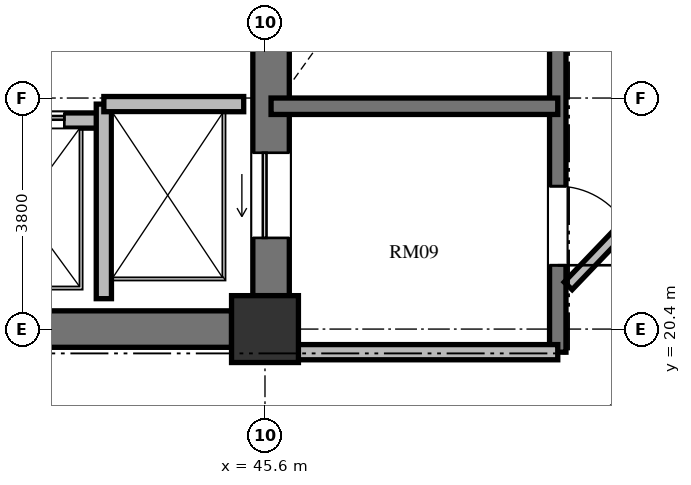
"""IFC4 building model, lengths in metres.
Left out: names, types, materials, properties, quantities, classifications, styles, units other than length and angle.
Written with IfcOpenShell. Run it as: python <this file> out.ifc"""

import sys

from ifc_helpers import new_model, si_unit, direction, frame, frame_2d, origin, origin_2d, place, context, subcontext, project, spatial, rectangle, extrude, element, fill, save


model = new_model("IFC4")
c1 = context("Model", 3, precision=1e-05, world=origin(), true_north=direction((0.0, 1.0)))
c2 = subcontext(c1, "Body", "Model", "MODEL_VIEW")
j1 = project(units=[si_unit("LENGTHUNIT", "METRE"), si_unit("PLANEANGLEUNIT", "RADIAN")], contexts=[c1])
p1 = place(None, origin())
s1 = spatial("IfcSite", under=j1, at=p1, CompositionType="ELEMENT")
p2 = place(p1, origin())
s2 = spatial("IfcBuilding", under=s1, at=p2, CompositionType="ELEMENT")
p3 = place(p2, frame((0.0, 0.0, 205.776)))
s3 = spatial("IfcBuildingStorey", under=s2, at=p3, CompositionType="ELEMENT", Elevation=205.776)
p4 = place(p3, frame((45.6, 20.4, 0.0), z_axis=(0.0, 0.0, 1.0), x_axis=(1.0, 0.0, 0.0)))
e1 = element("IfcColumn", 1, at=p4, inside=s3, PredefinedType="COLUMN", context=c2, shape_type="SweptSolid", body=[
    extrude(rectangle(XDim=1.1, YDim=1.1, at=origin_2d()), origin(), (0.0, 0.0, 1.0), 3.648),
])
p5 = place(p3, frame((45.7, 20.95, 0.0), z_axis=(0.0, 0.0, 1.0), x_axis=(0.0, 1.0, 0.0)))
e2 = element("IfcWall", 2, at=p5, inside=s3, PredefinedType="SHEAR", context=c2, shape_type="SweptSolid", body=[
    extrude(rectangle(XDim=14.1, YDim=0.6, at=frame_2d((7.05, 0.0))), origin(), (0.0, 0.0, 1.0), 3.648),
])
p6 = place(p5, frame((11.75, 0.0, 0.0)))
e3 = element("IfcOpeningElement", 3, at=p6, cuts=e2, PredefinedType="OPENING", context=c2, shape_type="SweptSolid", body=[
    extrude(rectangle(XDim=1.4, YDim=2.3, at=frame_2d((0.7, 1.15))), frame((0.0, 0.31, 0.0), z_axis=(0.0, -1.0, 0.0), x_axis=(1.0, 0.0, 0.0)), (0.0, 0.0, 1.0), 0.62),
])
p7 = place(p5, frame((0.95, 0.0, 0.0)))
e4 = element("IfcOpeningElement", 4, at=p7, cuts=e2, PredefinedType="OPENING", context=c2, shape_type="SweptSolid", body=[
    extrude(rectangle(XDim=1.4, YDim=2.3, at=frame_2d((0.7, 1.15))), frame((0.0, 0.31, 0.0), z_axis=(0.0, -1.0, 0.0), x_axis=(1.0, 0.0, 0.0)), (0.0, 0.0, 1.0), 0.62),
])
p8 = place(p3, frame((39.6, 20.4, 0.0), z_axis=(0.0, 0.0, 1.0), x_axis=(1.0, 0.0, 0.0)))
e5 = element("IfcWall", 5, at=p8, inside=s3, PredefinedType="SHEAR", context=c2, shape_type="SweptSolid", body=[
    extrude(rectangle(XDim=5.45, YDim=0.6, at=frame_2d((2.725, 0.0))), origin(), (0.0, 0.0, 1.0), 3.648),
])
p9 = place(p3, frame((26.75, 23.83, 0.0), z_axis=(0.0, 0.0, 1.0), x_axis=(1.0, 0.0, 0.0)))
e6 = element("IfcWall", 6, at=p9, inside=s3, PredefinedType="SOLIDWALL", context=c2, shape_type="SweptSolid", body=[
    extrude(rectangle(XDim=16.2, YDim=0.25, at=frame_2d((8.1, 0.0))), origin(), (0.0, 0.0, 1.0), 3.448),
])
p10 = place(p9, frame((4.75, 0.0, 0.0)))
e7 = element("IfcOpeningElement", 7, at=p10, cuts=e6, PredefinedType="OPENING", context=c2, shape_type="SweptSolid", body=[
    extrude(rectangle(XDim=1.4, YDim=2.2, at=frame_2d((0.7, 1.1))), frame((0.0, 0.135, 0.0), z_axis=(0.0, -1.0, 0.0), x_axis=(1.0, 0.0, 0.0)), (0.0, 0.0, 1.0), 0.27),
])
p11 = place(p9, frame((11.7, 0.0, 0.0)))
e8 = element("IfcOpeningElement", 8, at=p11, cuts=e6, PredefinedType="OPENING", context=c2, shape_type="SweptSolid", body=[
    extrude(rectangle(XDim=1.1, YDim=2.2, at=frame_2d((0.55, 1.1))), frame((0.0, 0.135, 0.0), z_axis=(0.0, -1.0, 0.0), x_axis=(1.0, 0.0, 0.0)), (0.0, 0.0, 1.0), 0.27),
])
p12 = place(p9, frame((14.15, 0.0, 0.0)))
e9 = element("IfcOpeningElement", 9, at=p12, cuts=e6, PredefinedType="OPENING", context=c2, shape_type="SweptSolid", body=[
    extrude(rectangle(XDim=1.4, YDim=2.3, at=frame_2d((0.7, 1.15))), frame((0.0, 0.135, 0.0), z_axis=(0.0, -1.0, 0.0), x_axis=(1.0, 0.0, 0.0)), (0.0, 0.0, 1.0), 0.27),
])
p13 = place(p3, frame((42.95, 20.9, 0.0), z_axis=(0.0, 0.0, 1.0), x_axis=(0.0, 1.0, 0.0)))
e10 = element("IfcWall", 10, at=p13, inside=s3, PredefinedType="SOLIDWALL", context=c2, shape_type="SweptSolid", body=[
    extrude(rectangle(XDim=3.2, YDim=0.25, at=frame_2d((1.6, 0.0))), origin(), (0.0, 0.0, 1.0), 3.448),
])
p14 = place(p3, frame((42.95, 24.1, 0.0), z_axis=(0.0, 0.0, 1.0), x_axis=(1.0, 0.0, 0.0)))
e11 = element("IfcWall", 11, at=p14, inside=s3, PredefinedType="SOLIDWALL", context=c2, shape_type="SweptSolid", body=[
    extrude(rectangle(XDim=2.3, YDim=0.25, at=frame_2d((1.15, 0.0))), origin(), (0.0, 0.0, 1.0), 3.448),
])
p15 = place(p3, frame((50.415, 35.845, 0.0), z_axis=(0.0, 0.0, 1.0), x_axis=(0.0, -1.0, 0.0)))
e12 = element("IfcWall", 12, at=p15, inside=s3, PredefinedType="SHEAR", context=c2, shape_type="SweptSolid", body=[
    extrude(rectangle(XDim=15.825, YDim=0.27, at=frame_2d((7.913, 0.0))), origin(), (0.0, 0.0, 1.0), 3.648),
])
p16 = place(p15, frame((4.445, 0.0, 0.0)))
e13 = element("IfcOpeningElement", 13, at=p16, cuts=e12, PredefinedType="OPENING", context=c2, shape_type="SweptSolid", body=[
    extrude(rectangle(XDim=1.2, YDim=2.15, at=frame_2d((0.6, 1.075))), frame((0.0, 0.145, 0.0), z_axis=(0.0, -1.0, 0.0), x_axis=(1.0, 0.0, 0.0)), (0.0, 0.0, 1.0), 0.29),
])
p17 = place(p15, frame((1.295, 0.0, 0.0)))
e14 = element("IfcOpeningElement", 14, at=p17, cuts=e12, PredefinedType="OPENING", context=c2, shape_type="SweptSolid", body=[
    extrude(rectangle(XDim=1.3, YDim=2.2, at=frame_2d((0.65, 1.1))), frame((0.0, 0.145, 0.0), z_axis=(0.0, -1.0, 0.0), x_axis=(1.0, 0.0, 0.0)), (0.0, 0.0, 1.0), 0.29),
])
p18 = place(p15, frame((13.095, 0.0, 0.0)))
e15 = element("IfcOpeningElement", 15, at=p18, cuts=e12, PredefinedType="OPENING", context=c2, shape_type="SweptSolid", body=[
    extrude(rectangle(XDim=1.3, YDim=2.2, at=frame_2d((0.65, 1.1))), frame((0.0, 0.145, 0.0), z_axis=(0.0, -1.0, 0.0), x_axis=(1.0, 0.0, 0.0)), (0.0, 0.0, 1.0), 0.29),
])
p19 = place(p3, frame((45.7, 24.065, 0.0), z_axis=(0.0, 0.0, 1.0), x_axis=(1.0, 0.0, 0.0)))
e16 = element("IfcWall", 16, at=p19, inside=s3, PredefinedType="SHEAR", context=c2, shape_type="SweptSolid", body=[
    extrude(rectangle(XDim=4.715, YDim=0.27, at=frame_2d((2.357, 0.0))), origin(), (0.0, 0.0, 1.0), 3.648),
])
p20 = place(p3, frame((45.7, 20.02, 0.0), z_axis=(0.0, 0.0, 1.0), x_axis=(1.0, 0.0, 0.0)))
e17 = element("IfcWall", 17, at=p20, inside=s3, PredefinedType="SOLIDWALL", context=c2, shape_type="SweptSolid", body=[
    extrude(rectangle(XDim=4.715, YDim=0.25, at=frame_2d((2.357, 0.0))), origin(), (0.0, 0.0, 1.0), 3.448),
])
p21 = place(p3, frame((53.078, 23.714, 0.0), z_axis=(0.0, 0.0, 1.0), x_axis=(-0.691353379446, -0.722516785085, 0.0)))
e18 = element("IfcWall", 18, at=p21, inside=s3, PredefinedType="PARTITIONING", context=c2, shape_type="SweptSolid", body=[
    extrude(rectangle(XDim=3.604, YDim=0.18, at=frame_2d((1.802, 0.0))), origin(), (0.0, 0.0, 1.0), 3.448),
])
p22 = place(p7, origin())
e19 = element("IfcDoor", 19, at=p22, inside=s3, OperationType="SLIDING_TO_LEFT", PredefinedType="DOOR", context=c2, shape_type="SweptSolid", body=[
    extrude(rectangle(XDim=1.4, YDim=2.3, at=frame_2d((0.7, 1.15))), frame((0.0, 0.025, 0.0), z_axis=(0.0, -1.0, 0.0), x_axis=(1.0, 0.0, 0.0)), (0.0, 0.0, 1.0), 0.05),
])
fill(e4, e19)
p23 = place(p12, origin())
e20 = element("IfcDoor", 20, at=p23, inside=s3, OperationType="SLIDING_TO_LEFT", PredefinedType="DOOR", context=c2, shape_type="SweptSolid", body=[
    extrude(rectangle(XDim=1.4, YDim=2.3, at=frame_2d((0.7, 1.15))), frame((0.0, 0.025, 0.0), z_axis=(0.0, -1.0, 0.0), x_axis=(1.0, 0.0, 0.0)), (0.0, 0.0, 1.0), 0.05),
])
fill(e9, e20)
p24 = place(p18, origin())
e21 = element("IfcDoor", 21, at=p24, inside=s3, OperationType="SINGLE_SWING_RIGHT", PredefinedType="DOOR", context=c2, shape_type="SweptSolid", body=[
    extrude(rectangle(XDim=1.3, YDim=2.2, at=frame_2d((0.65, 1.1))), frame((0.0, 0.025, 0.0), z_axis=(0.0, -1.0, 0.0), x_axis=(1.0, 0.0, 0.0)), (0.0, 0.0, 1.0), 0.05),
])
fill(e15, e21)
save(model, sys.argv[1])
